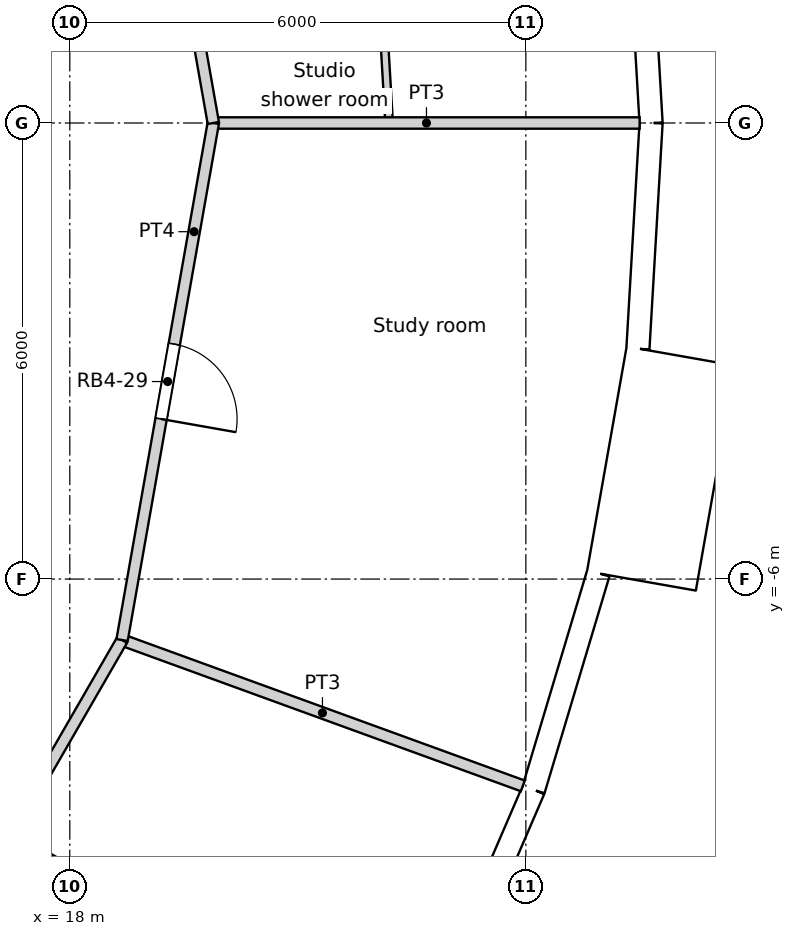
"""IFC4 building model, lengths in metres.
Left out: names, types, materials, properties, quantities, classifications, styles, units other than length and angle.
Written with IfcOpenShell. Run it as: python <this file> out.ifc"""

import sys

from ifc_helpers import new_model, si_unit, direction, frame, frame_2d, origin, origin_2d, place, context, subcontext, project, spatial, rectangle, circle, extrude, element, fill, save


model = new_model("IFC4")
c1 = context("Model", 3, precision=1e-05, world=origin(), true_north=direction((0.0, 1.0)))
c2 = subcontext(c1, "Body", "Model", "MODEL_VIEW")
j1 = project(units=[si_unit("LENGTHUNIT", "METRE"), si_unit("PLANEANGLEUNIT", "RADIAN")], contexts=[c1])
p1 = place(None, origin())
s1 = spatial("IfcSite", under=j1, at=p1, CompositionType="ELEMENT")
p2 = place(p1, origin())
s2 = spatial("IfcBuilding", under=s1, at=p2, CompositionType="ELEMENT")
p3 = place(p2, frame((0.0, 0.0, 158.4)))
s3 = spatial("IfcBuildingStorey", under=s2, at=p3, CompositionType="ELEMENT", Elevation=158.4)
for number, where, z_axis, x_axis in (
    (1, (24.548, 0.0, 0.0), (0.0, 0.0, 1.0), (1.0, 0.0, 0.0)),
    (2, (23.886, -5.661, 0.0), (0.0, 0.0, 1.0), (1.0, 0.0, 0.0)),
):
    element("IfcColumn", number, at=place(p3, frame(where, z_axis=z_axis, x_axis=x_axis)), inside=s3, PredefinedType="COLUMN", context=c2, shape_type="SweptSolid", body=[
        extrude(circle(Radius=0.6, at=origin_2d()), origin(), (0.0, 0.0, 1.0), 3.6),
    ])
for number, where, z_axis, x_axis in (
    (3, (18.822, 0.0, 0.0), (0.0, 0.0, 1.0), (1.0, 0.0, 0.0)),
    (4, (17.986, -5.548, 0.0), (0.0, 0.0, 1.0), (1.0, 0.0, 0.0)),
):
    element("IfcColumn", number, at=place(p3, frame(where, z_axis=z_axis, x_axis=x_axis)), inside=s3, PredefinedType="COLUMN", context=c2, shape_type="SweptSolid", body=[
        extrude(circle(Radius=0.65, at=origin_2d()), origin(), (0.0, 0.0, 1.0), 3.6),
    ])
p4 = place(p3, frame((25.647, 0.0, 0.0), z_axis=(0.0, 0.0, 1.0), x_axis=(-0.058144307138, 0.998308188661, 0.0)))
e5 = element("IfcWall", 5, at=p4, inside=s3, PredefinedType="SOLIDWALL", context=c2, shape_type="SweptSolid", body=[
    extrude(rectangle(XDim=2.973, YDim=0.3, at=frame_2d((1.486, 0.0))), origin(), (0.0, 0.0, 1.0), 3.3),
])
p5 = place(p4, frame((1.486, 0.0, 1.55)))
e6 = element("IfcOpeningElement", 6, at=p5, cuts=e5, PredefinedType="OPENING", context=c2, shape_type="SweptSolid", body=[
    extrude(circle(Radius=0.9, at=origin_2d()), frame((0.0, 0.16, 0.0), z_axis=(0.0, -1.0, 0.0), x_axis=(1.0, 0.0, 0.0)), (0.0, 0.0, 1.0), 0.32),
])
p6 = place(p3, frame((22.923, -11.502, 0.0), z_axis=(0.0, 0.0, 1.0), x_axis=(0.396148129016, 0.918186614952, 0.0)))
e7 = element("IfcWall", 7, at=p6, inside=s3, PredefinedType="SOLIDWALL", context=c2, shape_type="SweptSolid", body=[
    extrude(rectangle(XDim=2.973, YDim=0.3, at=frame_2d((1.486, 0.0))), origin(), (0.0, 0.0, 1.0), 3.3),
])
p7 = place(p6, frame((1.486, 0.0, 1.55)))
e8 = element("IfcOpeningElement", 8, at=p7, cuts=e7, PredefinedType="OPENING", context=c2, shape_type="SweptSolid", body=[
    extrude(circle(Radius=0.9, at=origin_2d()), frame((0.0, 0.16, 0.0), z_axis=(0.0, -1.0, 0.0), x_axis=(1.0, 0.0, 0.0)), (0.0, 0.0, 1.0), 0.32),
])
p8 = place(p3, frame((24.101, -8.772, 0.0), z_axis=(0.0, 0.0, 1.0), x_axis=(0.286782750849, 0.957995643944, 0.0)))
e9 = element("IfcWall", 9, at=p8, inside=s3, PredefinedType="SOLIDWALL", context=c2, shape_type="SweptSolid", body=[
    extrude(rectangle(XDim=2.973, YDim=0.3, at=frame_2d((1.486, 0.0))), origin(), (0.0, 0.0, 1.0), 3.3),
])
p9 = place(p8, frame((1.486, 0.0, 1.55)))
e10 = element("IfcOpeningElement", 10, at=p9, cuts=e9, PredefinedType="OPENING", context=c2, shape_type="SweptSolid", body=[
    extrude(circle(Radius=0.9, at=origin_2d()), frame((0.0, 0.16, 0.0), z_axis=(0.0, -1.0, 0.0), x_axis=(1.0, 0.0, 0.0)), (0.0, 0.0, 1.0), 0.32),
])
p10 = place(p3, frame((25.521, -6.023, -0.3), z_axis=(0.0, 0.0, 1.0), x_axis=(0.173669267716, 0.984804034035, 0.0)))
e11 = element("IfcWall", 11, at=p10, inside=s3, PredefinedType="ELEMENTEDWALL", context=c2, shape_type="SweptSolid", body=[
    extrude(rectangle(XDim=3.0, YDim=1.45, at=frame_2d((1.5, 0.0))), origin(), (0.0, 0.0, 1.0), 3.6),
])
p11 = place(p10, frame((1.5, 0.0, 1.85)))
e12 = element("IfcOpeningElement", 12, at=p11, cuts=e11, PredefinedType="OPENING", context=c2, shape_type="SweptSolid", body=[
    extrude(circle(Radius=0.9, at=origin_2d()), frame((0.0, 0.735, 0.0), z_axis=(0.0, -1.0, 0.0), x_axis=(1.0, 0.0, 0.0)), (0.0, 0.0, 1.0), 1.47),
])
p12 = place(p3, frame((25.475, -2.968, 0.0), z_axis=(0.0, 0.0, 1.0), x_axis=(0.058144307138, 0.998308188661, 0.0)))
e13 = element("IfcWall", 13, at=p12, inside=s3, PredefinedType="SOLIDWALL", context=c2, shape_type="SweptSolid", body=[
    extrude(rectangle(XDim=2.973, YDim=0.3, at=frame_2d((1.486, 0.0))), origin(), (0.0, 0.0, 1.0), 3.3),
])
p13 = place(p12, frame((1.486, 0.0, 1.55)))
e14 = element("IfcOpeningElement", 14, at=p13, cuts=e13, PredefinedType="OPENING", context=c2, shape_type="SweptSolid", body=[
    extrude(circle(Radius=0.9, at=origin_2d()), frame((0.0, 0.16, 0.0), z_axis=(0.0, -1.0, 0.0), x_axis=(1.0, 0.0, 0.0)), (0.0, 0.0, 1.0), 0.32),
])
p14 = place(p3, frame((18.688, 6.802, 0.0), z_axis=(0.0, 0.0, 1.0), x_axis=(0.173831710537, -0.984775373581, 0.0)))
e15 = element("IfcWall", 15, at=p14, inside=s3, PredefinedType="PARTITIONING", context=c2, shape_type="SweptSolid", body=[
    extrude(rectangle(XDim=6.907, YDim=0.15, at=frame_2d((3.454, 0.0))), origin(), (0.0, 0.0, 1.0), 3.3),
])
p15 = place(p14, frame((3.167, 0.0, 0.0)))
e16 = element("IfcOpeningElement", 16, at=p15, cuts=e15, PredefinedType="OPENING", context=c2, shape_type="SweptSolid", body=[
    extrude(rectangle(XDim=1.0, YDim=2.1, at=frame_2d((0.5, 1.05))), frame((0.0, 0.075, 0.0), z_axis=(0.0, -1.0, 0.0), x_axis=(1.0, 0.0, 0.0)), (0.0, 0.0, 1.0), 0.15),
])
p16 = place(p3, frame((15.235, -12.784, 0.0), z_axis=(0.0, 0.0, 1.0), x_axis=(0.499914202267, 0.866074933462, 0.0)))
e17 = element("IfcWall", 17, at=p16, inside=s3, PredefinedType="PARTITIONING", context=c2, shape_type="SweptSolid", body=[
    extrude(rectangle(XDim=6.907, YDim=0.15, at=frame_2d((3.454, 0.0))), origin(), (0.0, 0.0, 1.0), 3.3),
])
p17 = place(p16, frame((3.003, 0.0, 0.0)))
e18 = element("IfcOpeningElement", 18, at=p17, cuts=e17, PredefinedType="OPENING", context=c2, shape_type="SweptSolid", body=[
    extrude(rectangle(XDim=1.0, YDim=2.04, at=frame_2d((0.5, 1.02))), frame((0.0, 0.075, 0.0), z_axis=(0.0, -1.0, 0.0), x_axis=(1.0, 0.0, 0.0)), (0.0, 0.0, 1.0), 0.15),
])
p18 = place(p3, frame((18.688, -6.802, 0.0), z_axis=(0.0, 0.0, 1.0), x_axis=(0.173728873845, 0.98479352069, 0.0)))
e19 = element("IfcWall", 19, at=p18, inside=s3, PredefinedType="PARTITIONING", context=c2, shape_type="SweptSolid", body=[
    extrude(rectangle(XDim=6.907, YDim=0.15, at=frame_2d((3.454, 0.0))), origin(), (0.0, 0.0, 1.0), 3.3),
])
p19 = place(p18, frame((2.953, 0.0, 0.0)))
e20 = element("IfcOpeningElement", 20, at=p19, cuts=e19, PredefinedType="OPENING", context=c2, shape_type="SweptSolid", body=[
    extrude(rectangle(XDim=1.0, YDim=2.04, at=frame_2d((0.5, 1.02))), frame((0.0, 0.075, 0.0), z_axis=(0.0, -1.0, 0.0), x_axis=(1.0, 0.0, 0.0)), (0.0, 0.0, 1.0), 0.15),
])
p20 = place(p3, frame((22.084, 2.005, 0.0), z_axis=(0.0, 0.0, 1.0), x_axis=(0.058230299749, -0.998303176491, 0.0)))
e21 = element("IfcWall", 21, at=p20, inside=s3, PredefinedType="PARTITIONING", context=c2, shape_type="SweptSolid", body=[
    extrude(rectangle(XDim=2.008, YDim=0.1, at=frame_2d((1.004, 0.0))), origin(), (0.0, 0.0, 1.0), 3.3),
])
p21 = place(p3, frame((19.888, 0.0, 0.0), z_axis=(0.0, 0.0, 1.0), x_axis=(1.0, 0.0, 0.0)))
e22 = element("IfcWall", 22, at=p21, inside=s3, PredefinedType="PARTITIONING", context=c2, shape_type="SweptSolid", body=[
    extrude(rectangle(XDim=5.609, YDim=0.15, at=frame_2d((2.805, 0.0))), origin(), (0.0, 0.0, 1.0), 3.3),
])
p22 = place(p3, frame((18.688, -6.802, 0.0), z_axis=(0.0, 0.0, 1.0), x_axis=(0.939686652043, -0.342036541866, 0.0)))
e23 = element("IfcWall", 23, at=p22, inside=s3, PredefinedType="PARTITIONING", context=c2, shape_type="SweptSolid", body=[
    extrude(rectangle(XDim=5.61, YDim=0.15, at=frame_2d((2.805, 0.0))), origin(), (0.0, 0.0, 1.0), 3.3),
])
p23 = place(p5, origin())
e24 = element("IfcWindow", 24, at=p23, inside=s3, PartitioningType="SINGLE_PANEL", PredefinedType="WINDOW", context=c2, shape_type="SweptSolid", body=[
    extrude(circle(Radius=0.9, at=origin_2d()), frame((0.0, 0.12, 0.0), z_axis=(0.0, -1.0, 0.0), x_axis=(1.0, 0.0, 0.0)), (0.0, 0.0, 1.0), 0.1),
])
fill(e6, e24)
p24 = place(p7, origin())
e25 = element("IfcWindow", 25, at=p24, inside=s3, PartitioningType="SINGLE_PANEL", PredefinedType="WINDOW", context=c2, shape_type="SweptSolid", body=[
    extrude(circle(Radius=0.9, at=origin_2d()), frame((0.0, 0.12, 0.0), z_axis=(0.0, -1.0, 0.0), x_axis=(1.0, 0.0, 0.0)), (0.0, 0.0, 1.0), 0.1),
])
fill(e8, e25)
p25 = place(p9, origin())
e26 = element("IfcWindow", 26, at=p25, inside=s3, PartitioningType="SINGLE_PANEL", PredefinedType="WINDOW", context=c2, shape_type="SweptSolid", body=[
    extrude(circle(Radius=0.9, at=origin_2d()), frame((0.0, 0.12, 0.0), z_axis=(0.0, -1.0, 0.0), x_axis=(1.0, 0.0, 0.0)), (0.0, 0.0, 1.0), 0.1),
])
fill(e10, e26)
p26 = place(p11, origin())
e27 = element("IfcWindow", 27, at=p26, inside=s3, PartitioningType="SINGLE_PANEL", PredefinedType="WINDOW", context=c2, shape_type="SweptSolid", body=[
    extrude(circle(Radius=0.9, at=origin_2d()), frame((0.0, 0.695, 0.0), z_axis=(0.0, -1.0, 0.0), x_axis=(1.0, 0.0, 0.0)), (0.0, 0.0, 1.0), 0.1),
])
fill(e12, e27)
p27 = place(p13, origin())
e28 = element("IfcWindow", 28, at=p27, inside=s3, PartitioningType="SINGLE_PANEL", PredefinedType="WINDOW", context=c2, shape_type="SweptSolid", body=[
    extrude(circle(Radius=0.9, at=origin_2d()), frame((0.0, 0.12, 0.0), z_axis=(0.0, -1.0, 0.0), x_axis=(1.0, 0.0, 0.0)), (0.0, 0.0, 1.0), 0.1),
])
fill(e14, e28)
p28 = place(p19, origin())
e29 = element("IfcDoor", 29, at=p28, inside=s3, OperationType="SINGLE_SWING_RIGHT", PredefinedType="DOOR", context=c2, shape_type="SweptSolid", body=[
    extrude(rectangle(XDim=1.0, YDim=2.04, at=frame_2d((0.5, 1.02))), frame((0.0, 0.025, 0.0), z_axis=(0.0, -1.0, 0.0), x_axis=(1.0, 0.0, 0.0)), (0.0, 0.0, 1.0), 0.05),
])
fill(e20, e29)
save(model, sys.argv[1])
